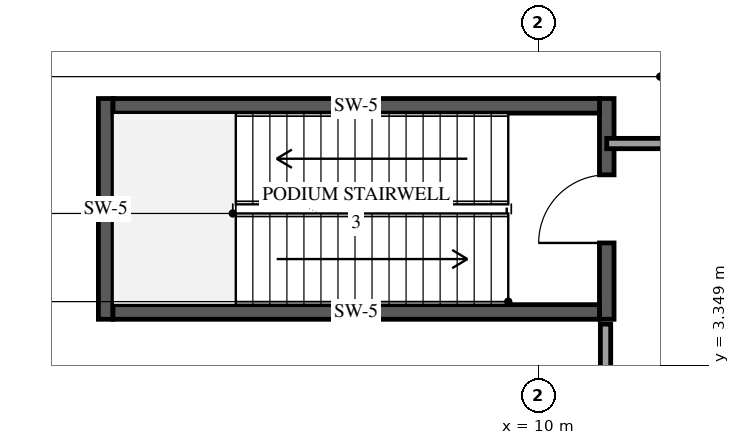
"""IFC4 building model, lengths in metres.
Left out: names, types, materials, properties, quantities, classifications, styles, units other than length and angle.
Written with IfcOpenShell. Run it as: python <this file> out.ifc"""

import sys

from ifc_helpers import new_model, si_unit, direction, frame, frame_2d, origin, place, context, subcontext, project, spatial, rectangle, extrude, element, fill, save


model = new_model("IFC4")
c1 = context("Model", 3, precision=1e-05, world=origin(), true_north=direction((0.0, 1.0)))
c2 = subcontext(c1, "Body", "Model", "MODEL_VIEW")
j1 = project(units=[si_unit("LENGTHUNIT", "METRE"), si_unit("PLANEANGLEUNIT", "RADIAN")], contexts=[c1])
p1 = place(None, origin())
s1 = spatial("IfcSite", under=j1, at=p1, CompositionType="ELEMENT")
p2 = place(p1, origin())
s2 = spatial("IfcBuilding", under=s1, at=p2, CompositionType="ELEMENT")
p3 = place(p2, origin())
s3 = spatial("IfcBuildingStorey", under=s2, at=p3, CompositionType="ELEMENT", Elevation=0.0)
p4 = place(p3, frame((2.88, 4.11, 0.0), z_axis=(0.0, 0.0, 1.0), x_axis=(0.0, 1.0, 0.0)))
e1 = element("IfcWall", 1, at=p4, inside=s3, PredefinedType="SHEAR", context=c2, shape_type="SweptSolid", body=[
    extrude(rectangle(XDim=3.63, YDim=0.24, at=frame_2d((1.815, 0.0))), origin(), (0.0, 0.0, 1.0), 6.0),
])
p5 = place(p3, frame((11.12, 4.11, 0.0), z_axis=(0.0, 0.0, 1.0), x_axis=(0.0, 1.0, 0.0)))
e2 = element("IfcWall", 2, at=p5, inside=s3, PredefinedType="SHEAR", context=c2, shape_type="SweptSolid", body=[
    extrude(rectangle(XDim=3.63, YDim=0.24, at=frame_2d((1.815, 0.0))), origin(), (0.0, 0.0, 1.0), 6.0),
])
p6 = place(p5, frame((1.255, 0.0, 0.0)))
e3 = element("IfcOpeningElement", 3, at=p6, cuts=e2, PredefinedType="OPENING", context=c2, shape_type="SweptSolid", body=[
    extrude(rectangle(XDim=1.12, YDim=2.15, at=frame_2d((0.56, 1.075))), frame((0.0, 0.13, 0.0), z_axis=(0.0, -1.0, 0.0), x_axis=(1.0, 0.0, 0.0)), (0.0, 0.0, 1.0), 0.26),
])
for number, where, z_axis, x_axis in (
    (4, (3.0, 4.23, 0.0), (0.0, 0.0, 1.0), (1.0, 0.0, 0.0)),
    (5, (3.0, 7.62, 0.0), (0.0, 0.0, 1.0), (1.0, 0.0, 0.0)),
):
    element("IfcWall", number, at=place(p3, frame(where, z_axis=z_axis, x_axis=x_axis)), inside=s3, PredefinedType="SHEAR", context=c2, shape_type="SweptSolid", body=[
        extrude(rectangle(XDim=8.0, YDim=0.24, at=frame_2d((4.0, 0.0))), origin(), (0.0, 0.0, 1.0), 6.0),
    ])
p7 = place(p3, frame((11.12, 7.0, 0.0), z_axis=(0.0, 0.0, 1.0), x_axis=(1.0, 0.0, 0.0)))
e6 = element("IfcWall", 6, at=p7, inside=s3, PredefinedType="PARTITIONING", context=c2, shape_type="SweptSolid", body=[
    extrude(rectangle(XDim=19.41, YDim=0.17, at=frame_2d((9.705, 0.0))), origin(), (0.0, 0.0, 1.0), 5.68),
])
p8 = place(p3, frame((11.1, 2.0, 0.0), z_axis=(0.0, 0.0, 1.0), x_axis=(0.0, 1.0, 0.0)))
e7 = element("IfcWall", 7, at=p8, inside=s3, PredefinedType="PARTITIONING", context=c2, shape_type="SweptSolid", body=[
    extrude(rectangle(XDim=2.03, YDim=0.17, at=frame_2d((1.015, 0.0))), origin(), (0.0, 0.0, 1.0), 5.68),
])
p9 = place(p6, origin())
e8 = element("IfcDoor", 8, at=p9, inside=s3, OperationType="SINGLE_SWING_LEFT", PredefinedType="DOOR", context=c2, shape_type="SweptSolid", body=[
    extrude(rectangle(XDim=1.12, YDim=2.15, at=frame_2d((0.56, 1.075))), frame((0.0, 0.025, 0.0), z_axis=(0.0, -1.0, 0.0), x_axis=(1.0, 0.0, 0.0)), (0.0, 0.0, 1.0), 0.05),
])
fill(e3, e8)
save(model, sys.argv[1])
